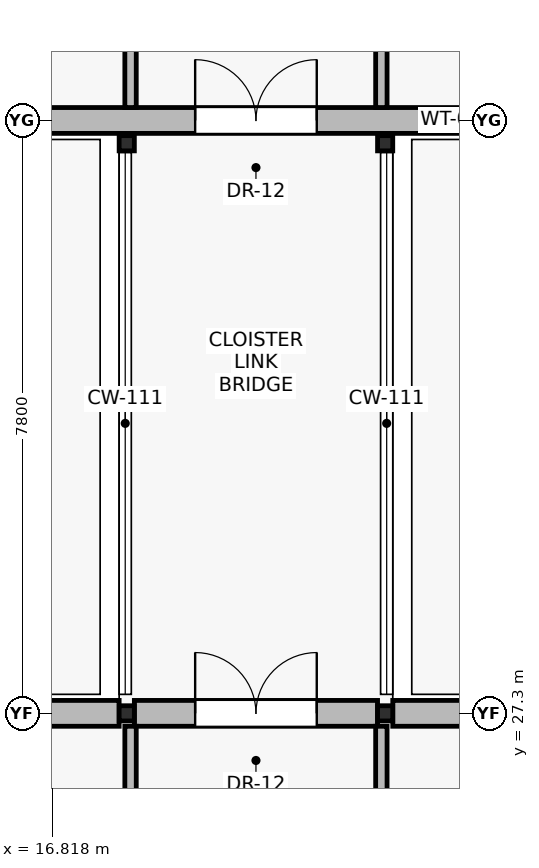
"""IFC4 building model, lengths in metres.
Left out: names, types, materials, properties, quantities, classifications, styles, units other than length and angle.
Written with IfcOpenShell. Run it as: python <this file> out.ifc"""

import sys

from ifc_helpers import new_model, si_unit, direction, frame, frame_2d, origin, origin_2d, place, context, subcontext, project, spatial, rectangle, hollow_rectangle, extrude, element, fill, save


model = new_model("IFC4")
c1 = context("Model", 3, precision=1e-05, world=origin(), true_north=direction((0.0, 1.0)))
c2 = subcontext(c1, "Body", "Model", "MODEL_VIEW")
j1 = project(units=[si_unit("LENGTHUNIT", "METRE"), si_unit("PLANEANGLEUNIT", "RADIAN")], contexts=[c1])
p1 = place(None, origin())
s1 = spatial("IfcSite", under=j1, at=p1, CompositionType="ELEMENT")
p2 = place(p1, origin())
s2 = spatial("IfcBuilding", under=s1, at=p2, CompositionType="ELEMENT")
p3 = place(p2, origin())
s3 = spatial("IfcBuildingStorey", under=s2, at=p3, CompositionType="ELEMENT", Elevation=0.0)
for number, where, z_axis, x_axis in (
    (1, (17.8, 27.3, 0.0), (0.0, 0.0, 1.0), (1.0, 0.0, 0.0)),
    (2, (21.2, 27.3, 0.0), (0.0, 0.0, 1.0), (1.0, 0.0, 0.0)),
    (3, (17.8, 34.8, 0.0), (0.0, 0.0, 1.0), (1.0, 0.0, 0.0)),
    (4, (21.2, 34.8, 0.0), (0.0, 0.0, 1.0), (1.0, 0.0, 0.0)),
):
    element("IfcColumn", number, at=place(p3, frame(where, z_axis=z_axis, x_axis=x_axis)), inside=s3, PredefinedType="COLUMN", context=c2, shape_type="SweptSolid", body=[
        extrude(hollow_rectangle(XDim=0.2, YDim=0.2, WallThickness=0.01, at=origin_2d()), origin(), (0.0, 0.0, 1.0), 4.8),
    ])
p4 = place(p3, frame((23.15, 35.1, 0.0), z_axis=(0.0, 0.0, 1.0), x_axis=(-1.0, 0.0, 0.0)))
e5 = element("IfcWall", 5, at=p4, inside=s3, PredefinedType="STANDARD", context=c2, shape_type="SweptSolid", body=[
    extrude(rectangle(XDim=7.3, YDim=0.34, at=frame_2d((3.65, 0.0))), origin(), (0.0, 0.0, 1.0), 3.385),
])
p5 = place(p4, frame((2.85, 0.0, 0.0)))
e6 = element("IfcOpeningElement", 6, at=p5, cuts=e5, PredefinedType="OPENING", context=c2, shape_type="SweptSolid", body=[
    extrude(rectangle(XDim=1.6, YDim=2.2, at=frame_2d((0.8, 1.1))), frame((0.0, 0.18, 0.0), z_axis=(0.0, -1.0, 0.0), x_axis=(1.0, 0.0, 0.0)), (0.0, 0.0, 1.0), 0.36),
])
p6 = place(p3, frame((15.925, 27.3, 0.0), z_axis=(0.0, 0.0, 1.0), x_axis=(1.0, 0.0, 0.0)))
e7 = element("IfcWall", 7, at=p6, inside=s3, PredefinedType="STANDARD", context=c2, shape_type="SweptSolid", body=[
    extrude(rectangle(XDim=1.775, YDim=0.34, at=frame_2d((0.887, 0.0))), origin(), (0.0, 0.0, 1.0), 4.14),
])
p7 = place(p3, frame((17.9, 27.3, 0.0), z_axis=(0.0, 0.0, 1.0), x_axis=(1.0, 0.0, 0.0)))
e8 = element("IfcWall", 8, at=p7, inside=s3, PredefinedType="STANDARD", context=c2, shape_type="SweptSolid", body=[
    extrude(rectangle(XDim=3.2, YDim=0.34, at=frame_2d((1.6, 0.0))), origin(), (0.0, 0.0, 1.0), 4.14),
])
p8 = place(p7, frame((0.8, 0.0, 0.0)))
e9 = element("IfcOpeningElement", 9, at=p8, cuts=e8, PredefinedType="OPENING", context=c2, shape_type="SweptSolid", body=[
    extrude(rectangle(XDim=1.6, YDim=2.2, at=frame_2d((0.8, 1.1))), frame((0.0, 0.18, 0.0), z_axis=(0.0, -1.0, 0.0), x_axis=(1.0, 0.0, 0.0)), (0.0, 0.0, 1.0), 0.36),
])
p9 = place(p3, frame((21.3, 27.3, 0.0), z_axis=(0.0, 0.0, 1.0), x_axis=(1.0, 0.0, 0.0)))
e10 = element("IfcWall", 10, at=p9, inside=s3, PredefinedType="STANDARD", context=c2, shape_type="SweptSolid", body=[
    extrude(rectangle(XDim=1.775, YDim=0.34, at=frame_2d((0.887, 0.0))), origin(), (0.0, 0.0, 1.0), 4.14),
])
for number, where, z_axis, x_axis in (
    (11, (17.85, 35.27, 0.0), (0.0, 0.0, 1.0), (0.0, 1.0, 0.0)),
    (12, (21.15, 35.27, 0.0), (0.0, 0.0, 1.0), (0.0, 1.0, 0.0)),
):
    element("IfcWall", number, at=place(p3, frame(where, z_axis=z_axis, x_axis=x_axis)), inside=s3, PredefinedType="PARTITIONING", context=c2, shape_type="SweptSolid", body=[
        extrude(rectangle(XDim=11.63, YDim=0.15, at=frame_2d((5.815, 0.0))), origin(), (0.0, 0.0, 1.0), 4.13),
    ])
for number, where, z_axis, x_axis in (
    (13, (17.85, 15.1, 0.0), (0.0, 0.0, 1.0), (0.0, 1.0, 0.0)),
    (14, (21.15, 15.1, 0.0), (0.0, 0.0, 1.0), (0.0, 1.0, 0.0)),
):
    element("IfcWall", number, at=place(p3, frame(where, z_axis=z_axis, x_axis=x_axis)), inside=s3, PredefinedType="PARTITIONING", context=c2, shape_type="SweptSolid", body=[
        extrude(rectangle(XDim=12.03, YDim=0.15, at=frame_2d((6.015, 0.0))), origin(), (0.0, 0.0, 1.0), 4.21),
    ])
p10 = place(p5, frame((1.6, 0.0, 0.0), z_axis=(0.0, 0.0, 1.0), x_axis=(-1.0, 0.0, 0.0)))
e15 = element("IfcDoor", 15, at=p10, inside=s3, OperationType="DOUBLE_DOOR_SINGLE_SWING", PredefinedType="DOOR", context=c2, shape_type="SweptSolid", body=[
    extrude(rectangle(XDim=1.6, YDim=2.2, at=frame_2d((0.8, 1.1))), frame((0.0, 0.025, 0.0), z_axis=(0.0, -1.0, 0.0), x_axis=(1.0, 0.0, 0.0)), (0.0, 0.0, 1.0), 0.05),
])
fill(e6, e15)
p11 = place(p8, origin())
e16 = element("IfcDoor", 16, at=p11, inside=s3, OperationType="DOUBLE_DOOR_SINGLE_SWING", PredefinedType="DOOR", context=c2, shape_type="SweptSolid", body=[
    extrude(rectangle(XDim=1.6, YDim=2.2, at=frame_2d((0.8, 1.1))), frame((0.0, 0.025, 0.0), z_axis=(0.0, -1.0, 0.0), x_axis=(1.0, 0.0, 0.0)), (0.0, 0.0, 1.0), 0.05),
])
fill(e9, e16)
save(model, sys.argv[1])
